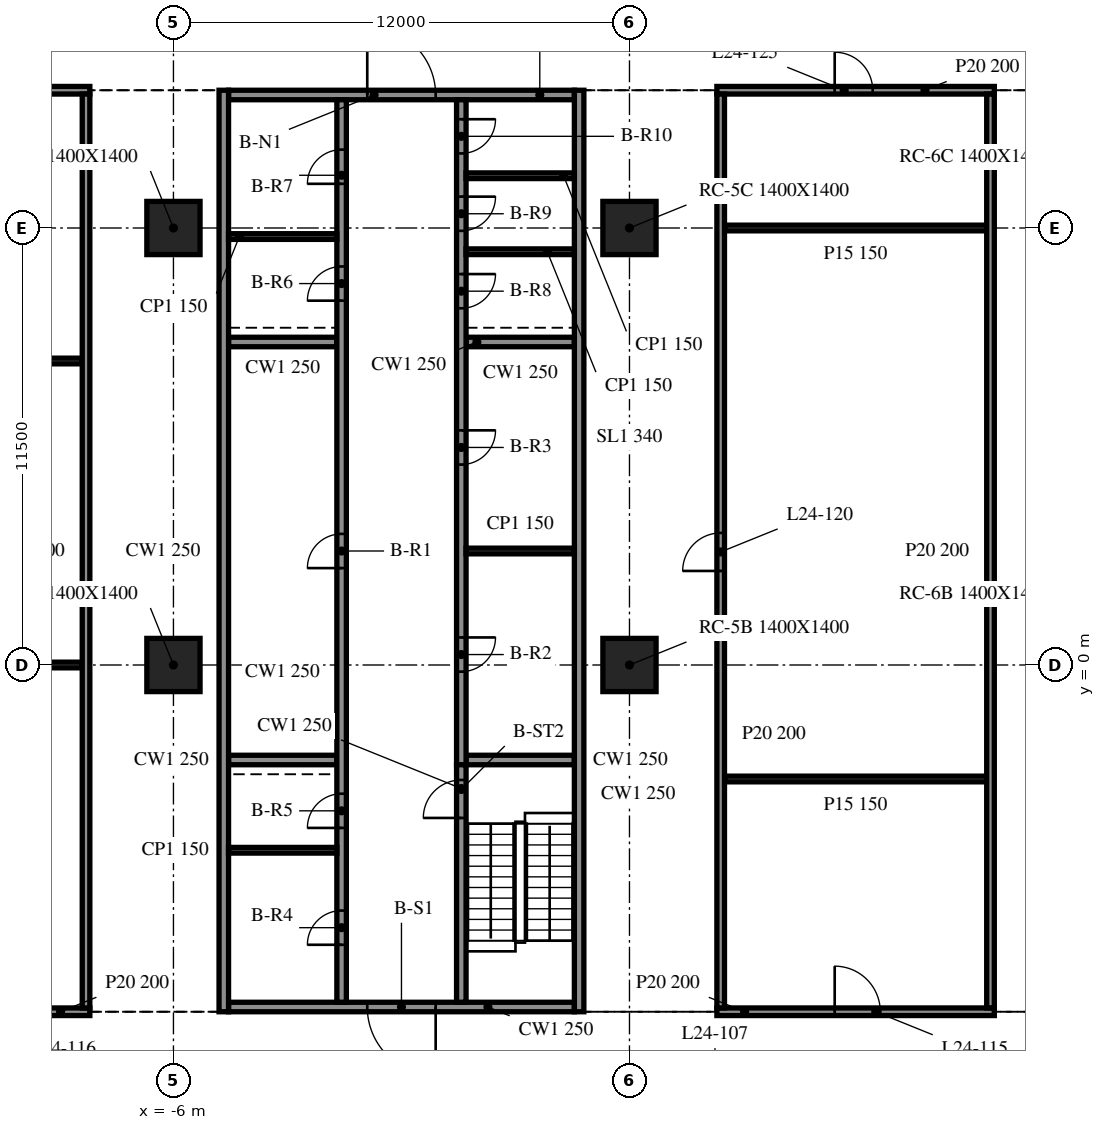
"""IFC4 building model, lengths in metres.
Left out: names, types, materials, properties, quantities, classifications, styles, units other than length and angle.
Written with IfcOpenShell. Run it as: python <this file> out.ifc"""

import sys

from ifc_helpers import new_model, si_unit, direction, frame, frame_2d, origin, origin_2d, place, context, subcontext, project, spatial, rectangle, extrude, element, fill, save


model = new_model("IFC4")
c1 = context("Model", 3, precision=1e-05, world=origin(), true_north=direction((0.0, 1.0)))
c2 = subcontext(c1, "Body", "Model", "MODEL_VIEW")
j1 = project(units=[si_unit("LENGTHUNIT", "METRE"), si_unit("PLANEANGLEUNIT", "RADIAN")], contexts=[c1])
p1 = place(None, origin())
s1 = spatial("IfcSite", under=j1, at=p1, CompositionType="ELEMENT")
p2 = place(p1, origin())
s2 = spatial("IfcBuilding", under=s1, at=p2, CompositionType="ELEMENT")
p3 = place(p2, frame((0.0, 0.0, 105.3)))
s3 = spatial("IfcBuildingStorey", under=s2, at=p3, CompositionType="ELEMENT", Elevation=105.3)
for number, where, z_axis, x_axis in (
    (1, (-6.0, 0.0, -0.34), (0.0, 0.0, 1.0), (1.0, 0.0, 0.0)),
    (2, (-6.0, 11.5, -0.34), (0.0, 0.0, 1.0), (1.0, 0.0, 0.0)),
    (3, (6.0, 0.0, -0.34), (0.0, 0.0, 1.0), (1.0, 0.0, 0.0)),
    (4, (6.0, 11.5, -0.34), (0.0, 0.0, 1.0), (1.0, 0.0, 0.0)),
):
    element("IfcColumn", number, at=place(p3, frame(where, z_axis=z_axis, x_axis=x_axis)), inside=s3, PredefinedType="COLUMN", context=c2, shape_type="SweptSolid", body=[
        extrude(rectangle(XDim=1.4, YDim=1.4, at=origin_2d()), origin(), (0.0, 0.0, 1.0), 4.1),
    ])
for number, where, z_axis, x_axis in (
    (5, (-4.675, 15.125, 0.0), (0.0, 0.0, 1.0), (0.0, -1.0, 0.0)),
    (6, (4.675, -9.125, 0.0), (0.0, 0.0, 1.0), (0.0, 1.0, 0.0)),
):
    element("IfcWall", number, at=place(p3, frame(where, z_axis=z_axis, x_axis=x_axis)), inside=s3, PredefinedType="SOLIDWALL", context=c2, shape_type="SweptSolid", body=[
        extrude(rectangle(XDim=24.25, YDim=0.25, at=frame_2d((12.125, 0.0))), origin(), (0.0, 0.0, 1.0), 3.76),
    ])
p4 = place(p3, frame((4.55, -9.0, 0.0), z_axis=(0.0, 0.0, 1.0), x_axis=(-1.0, 0.0, 0.0)))
e7 = element("IfcWall", 7, at=p4, inside=s3, PredefinedType="SOLIDWALL", context=c2, shape_type="SweptSolid", body=[
    extrude(rectangle(XDim=9.1, YDim=0.25, at=frame_2d((4.55, 0.0))), origin(), (0.0, 0.0, 1.0), 3.76),
])
p5 = place(p4, frame((3.65, 0.0, 0.0)))
e8 = element("IfcOpeningElement", 8, at=p5, cuts=e7, PredefinedType="OPENING", context=c2, shape_type="SweptSolid", body=[
    extrude(rectangle(XDim=1.8, YDim=2.1, at=frame_2d((0.9, 1.05))), frame((0.0, 0.135, 0.0), z_axis=(0.0, -1.0, 0.0), x_axis=(1.0, 0.0, 0.0)), (0.0, 0.0, 1.0), 0.27),
])
p6 = place(p3, frame((-4.55, 15.0, 0.0), z_axis=(0.0, 0.0, 1.0), x_axis=(1.0, 0.0, 0.0)))
e9 = element("IfcWall", 9, at=p6, inside=s3, PredefinedType="SOLIDWALL", context=c2, shape_type="SweptSolid", body=[
    extrude(rectangle(XDim=9.1, YDim=0.25, at=frame_2d((4.55, 0.0))), origin(), (0.0, 0.0, 1.0), 3.76),
])
p7 = place(p6, frame((3.65, 0.0, 0.0)))
e10 = element("IfcOpeningElement", 10, at=p7, cuts=e9, PredefinedType="OPENING", context=c2, shape_type="SweptSolid", body=[
    extrude(rectangle(XDim=1.8, YDim=2.1, at=frame_2d((0.9, 1.05))), frame((0.0, 0.135, 0.0), z_axis=(0.0, -1.0, 0.0), x_axis=(1.0, 0.0, 0.0)), (0.0, 0.0, 1.0), 0.27),
])
p8 = place(p3, frame((-1.575, -8.875, 0.0), z_axis=(0.0, 0.0, 1.0), x_axis=(0.0, 1.0, 0.0)))
e11 = element("IfcWall", 11, at=p8, inside=s3, PredefinedType="SOLIDWALL", context=c2, shape_type="SweptSolid", body=[
    extrude(rectangle(XDim=23.75, YDim=0.25, at=frame_2d((11.875, 0.0))), origin(), (0.0, 0.0, 1.0), 3.76),
])
p9 = place(p8, frame((11.425, 0.0, 0.0)))
e12 = element("IfcOpeningElement", 12, at=p9, cuts=e11, PredefinedType="OPENING", context=c2, shape_type="SweptSolid", body=[
    extrude(rectangle(XDim=0.9, YDim=2.1, at=frame_2d((0.45, 1.05))), frame((0.0, 0.135, 0.0), z_axis=(0.0, -1.0, 0.0), x_axis=(1.0, 0.0, 0.0)), (0.0, 0.0, 1.0), 0.27),
])
p10 = place(p8, frame((1.512, 0.0, 0.0)))
e13 = element("IfcOpeningElement", 13, at=p10, cuts=e11, PredefinedType="OPENING", context=c2, shape_type="SweptSolid", body=[
    extrude(rectangle(XDim=0.9, YDim=2.1, at=frame_2d((0.45, 1.05))), frame((0.0, 0.135, 0.0), z_axis=(0.0, -1.0, 0.0), x_axis=(1.0, 0.0, 0.0)), (0.0, 0.0, 1.0), 0.27),
])
p11 = place(p8, frame((4.587, 0.0, 0.0)))
e14 = element("IfcOpeningElement", 14, at=p11, cuts=e11, PredefinedType="OPENING", context=c2, shape_type="SweptSolid", body=[
    extrude(rectangle(XDim=0.9, YDim=2.1, at=frame_2d((0.45, 1.05))), frame((0.0, 0.135, 0.0), z_axis=(0.0, -1.0, 0.0), x_axis=(1.0, 0.0, 0.0)), (0.0, 0.0, 1.0), 0.27),
])
p12 = place(p8, frame((18.462, 0.0, 0.0)))
e15 = element("IfcOpeningElement", 15, at=p12, cuts=e11, PredefinedType="OPENING", context=c2, shape_type="SweptSolid", body=[
    extrude(rectangle(XDim=0.9, YDim=2.1, at=frame_2d((0.45, 1.05))), frame((0.0, 0.135, 0.0), z_axis=(0.0, -1.0, 0.0), x_axis=(1.0, 0.0, 0.0)), (0.0, 0.0, 1.0), 0.27),
])
p13 = place(p8, frame((21.538, 0.0, 0.0)))
e16 = element("IfcOpeningElement", 16, at=p13, cuts=e11, PredefinedType="OPENING", context=c2, shape_type="SweptSolid", body=[
    extrude(rectangle(XDim=0.9, YDim=2.1, at=frame_2d((0.45, 1.05))), frame((0.0, 0.135, 0.0), z_axis=(0.0, -1.0, 0.0), x_axis=(1.0, 0.0, 0.0)), (0.0, 0.0, 1.0), 0.27),
])
p14 = place(p3, frame((1.575, -8.875, 0.0), z_axis=(0.0, 0.0, 1.0), x_axis=(0.0, 1.0, 0.0)))
e17 = element("IfcWall", 17, at=p14, inside=s3, PredefinedType="SOLIDWALL", context=c2, shape_type="SweptSolid", body=[
    extrude(rectangle(XDim=6.25, YDim=0.25, at=frame_2d((3.125, 0.0))), origin(), (0.0, 0.0, 1.0), 3.76),
])
p15 = place(p14, frame((4.85, 0.0, 0.0)))
e18 = element("IfcOpeningElement", 18, at=p15, cuts=e17, PredefinedType="OPENING", context=c2, shape_type="SweptSolid", body=[
    extrude(rectangle(XDim=1.0, YDim=2.1, at=frame_2d((0.5, 1.05))), frame((0.0, 0.135, 0.0), z_axis=(0.0, -1.0, 0.0), x_axis=(1.0, 0.0, 0.0)), (0.0, 0.0, 1.0), 0.27),
])
p16 = place(p3, frame((1.575, 14.875, 0.0), z_axis=(0.0, 0.0, 1.0), x_axis=(0.0, -1.0, 0.0)))
e19 = element("IfcWall", 19, at=p16, inside=s3, PredefinedType="SOLIDWALL", context=c2, shape_type="SweptSolid", body=[
    extrude(rectangle(XDim=17.5, YDim=0.25, at=frame_2d((8.75, 0.0))), origin(), (0.0, 0.0, 1.0), 3.76),
])
p17 = place(p16, frame((14.15, 0.0, 0.0)))
e20 = element("IfcOpeningElement", 20, at=p17, cuts=e19, PredefinedType="OPENING", context=c2, shape_type="SweptSolid", body=[
    extrude(rectangle(XDim=0.9, YDim=2.1, at=frame_2d((0.45, 1.05))), frame((0.0, 0.135, 0.0), z_axis=(0.0, -1.0, 0.0), x_axis=(1.0, 0.0, 0.0)), (0.0, 0.0, 1.0), 0.27),
])
p18 = place(p16, frame((8.7, 0.0, 0.0)))
e21 = element("IfcOpeningElement", 21, at=p18, cuts=e19, PredefinedType="OPENING", context=c2, shape_type="SweptSolid", body=[
    extrude(rectangle(XDim=0.9, YDim=2.1, at=frame_2d((0.45, 1.05))), frame((0.0, 0.135, 0.0), z_axis=(0.0, -1.0, 0.0), x_axis=(1.0, 0.0, 0.0)), (0.0, 0.0, 1.0), 0.27),
])
p19 = place(p16, frame((4.587, 0.0, 0.0)))
e22 = element("IfcOpeningElement", 22, at=p19, cuts=e19, PredefinedType="OPENING", context=c2, shape_type="SweptSolid", body=[
    extrude(rectangle(XDim=0.9, YDim=2.1, at=frame_2d((0.45, 1.05))), frame((0.0, 0.135, 0.0), z_axis=(0.0, -1.0, 0.0), x_axis=(1.0, 0.0, 0.0)), (0.0, 0.0, 1.0), 0.27),
])
p20 = place(p16, frame((2.55, 0.0, 0.0)))
e23 = element("IfcOpeningElement", 23, at=p20, cuts=e19, PredefinedType="OPENING", context=c2, shape_type="SweptSolid", body=[
    extrude(rectangle(XDim=0.9, YDim=2.1, at=frame_2d((0.45, 1.05))), frame((0.0, 0.135, 0.0), z_axis=(0.0, -1.0, 0.0), x_axis=(1.0, 0.0, 0.0)), (0.0, 0.0, 1.0), 0.27),
])
p21 = place(p16, frame((0.512, 0.0, 0.0)))
e24 = element("IfcOpeningElement", 24, at=p21, cuts=e19, PredefinedType="OPENING", context=c2, shape_type="SweptSolid", body=[
    extrude(rectangle(XDim=0.9, YDim=2.1, at=frame_2d((0.45, 1.05))), frame((0.0, 0.135, 0.0), z_axis=(0.0, -1.0, 0.0), x_axis=(1.0, 0.0, 0.0)), (0.0, 0.0, 1.0), 0.27),
])
for number, where, z_axis, x_axis in (
    (25, (-4.55, -2.5, 0.0), (0.0, 0.0, 1.0), (1.0, 0.0, 0.0)),
    (26, (-4.55, 8.5, 0.0), (0.0, 0.0, 1.0), (1.0, 0.0, 0.0)),
    (27, (1.7, -2.5, 0.0), (0.0, 0.0, 1.0), (1.0, 0.0, 0.0)),
    (28, (1.7, 8.5, 0.0), (0.0, 0.0, 1.0), (1.0, 0.0, 0.0)),
):
    element("IfcWall", number, at=place(p3, frame(where, z_axis=z_axis, x_axis=x_axis)), inside=s3, PredefinedType="SOLIDWALL", context=c2, shape_type="SweptSolid", body=[
        extrude(rectangle(XDim=2.85, YDim=0.25, at=frame_2d((1.425, 0.0))), origin(), (0.0, 0.0, 1.0), 3.76),
    ])
for number, where, z_axis, x_axis in (
    (29, (1.7, 3.0, 0.0), (0.0, 0.0, 1.0), (1.0, 0.0, 0.0)),
    (30, (-4.55, -4.875, 0.0), (0.0, 0.0, 1.0), (1.0, 0.0, 0.0)),
    (31, (-4.55, 11.275, 0.0), (0.0, 0.0, 1.0), (1.0, 0.0, 0.0)),
    (32, (1.7, 10.875, 0.0), (0.0, 0.0, 1.0), (1.0, 0.0, 0.0)),
    (33, (1.7, 12.875, 0.0), (0.0, 0.0, 1.0), (1.0, 0.0, 0.0)),
):
    element("IfcWall", number, at=place(p3, frame(where, z_axis=z_axis, x_axis=x_axis)), inside=s3, PredefinedType="PARTITIONING", context=c2, shape_type="SweptSolid", body=[
        extrude(rectangle(XDim=2.85, YDim=0.15, at=frame_2d((1.425, 0.0))), origin(), (0.0, 0.0, 1.0), 3.76),
    ])
p22 = place(p3, frame((-15.9, -9.125, 0.0), z_axis=(0.0, 0.0, 1.0), x_axis=(1.0, 0.0, 0.0)))
e34 = element("IfcWall", 34, at=p22, inside=s3, PredefinedType="PARTITIONING", context=c2, shape_type="SweptSolid", body=[
    extrude(rectangle(XDim=7.7, YDim=0.2, at=frame_2d((3.85, 0.0))), origin(), (0.0, 0.0, 1.0), 3.76),
])
p23 = place(p22, frame((3.3, 0.0, 0.0)))
e35 = element("IfcOpeningElement", 35, at=p23, cuts=e34, PredefinedType="OPENING", context=c2, shape_type="SweptSolid", body=[
    extrude(rectangle(XDim=1.2, YDim=2.1, at=frame_2d((0.6, 1.05))), frame((0.0, 0.11, 0.0), z_axis=(0.0, -1.0, 0.0), x_axis=(1.0, 0.0, 0.0)), (0.0, 0.0, 1.0), 0.22),
])
p24 = place(p3, frame((8.3, -9.125, 0.0), z_axis=(0.0, 0.0, 1.0), x_axis=(1.0, 0.0, 0.0)))
e36 = element("IfcWall", 36, at=p24, inside=s3, PredefinedType="PARTITIONING", context=c2, shape_type="SweptSolid", body=[
    extrude(rectangle(XDim=7.3, YDim=0.2, at=frame_2d((3.65, 0.0))), origin(), (0.0, 0.0, 1.0), 3.76),
])
p25 = place(p24, frame((3.1, 0.0, 0.0)))
e37 = element("IfcOpeningElement", 37, at=p25, cuts=e36, PredefinedType="OPENING", context=c2, shape_type="SweptSolid", body=[
    extrude(rectangle(XDim=1.2, YDim=2.1, at=frame_2d((0.6, 1.05))), frame((0.0, 0.11, 0.0), z_axis=(0.0, -1.0, 0.0), x_axis=(1.0, 0.0, 0.0)), (0.0, 0.0, 1.0), 0.22),
])
p26 = place(p3, frame((8.5, -3.0, 0.0), z_axis=(0.0, 0.0, 1.0), x_axis=(1.0, 0.0, 0.0)))
e38 = element("IfcWall", 38, at=p26, inside=s3, PredefinedType="PARTITIONING", context=c2, shape_type="SweptSolid", body=[
    extrude(rectangle(XDim=6.9, YDim=0.15, at=frame_2d((3.45, 0.0))), origin(), (0.0, 0.0, 1.0), 3.76),
])
for number, where, z_axis, x_axis in (
    (39, (-15.7, 0.0, 0.0), (0.0, 0.0, 1.0), (1.0, 0.0, 0.0)),
    (40, (-15.7, 8.0, 0.0), (0.0, 0.0, 1.0), (1.0, 0.0, 0.0)),
):
    element("IfcWall", number, at=place(p3, frame(where, z_axis=z_axis, x_axis=x_axis)), inside=s3, PredefinedType="PARTITIONING", context=c2, shape_type="SweptSolid", body=[
        extrude(rectangle(XDim=7.3, YDim=0.15, at=frame_2d((3.65, 0.0))), origin(), (0.0, 0.0, 1.0), 3.76),
    ])
p27 = place(p3, frame((8.5, 11.5, 0.0), z_axis=(0.0, 0.0, 1.0), x_axis=(1.0, 0.0, 0.0)))
e41 = element("IfcWall", 41, at=p27, inside=s3, PredefinedType="PARTITIONING", context=c2, shape_type="SweptSolid", body=[
    extrude(rectangle(XDim=6.9, YDim=0.15, at=frame_2d((3.45, 0.0))), origin(), (0.0, 0.0, 1.0), 3.76),
])
p28 = place(p3, frame((-15.9, 15.125, 0.0), z_axis=(0.0, 0.0, 1.0), x_axis=(1.0, 0.0, 0.0)))
e42 = element("IfcWall", 42, at=p28, inside=s3, PredefinedType="PARTITIONING", context=c2, shape_type="SweptSolid", body=[
    extrude(rectangle(XDim=7.7, YDim=0.2, at=frame_2d((3.85, 0.0))), origin(), (0.0, 0.0, 1.0), 3.76),
])
p29 = place(p28, frame((3.3, 0.0, 0.0)))
e43 = element("IfcOpeningElement", 43, at=p29, cuts=e42, PredefinedType="OPENING", context=c2, shape_type="SweptSolid", body=[
    extrude(rectangle(XDim=1.0, YDim=2.1, at=frame_2d((0.5, 1.05))), frame((0.0, 0.11, 0.0), z_axis=(0.0, -1.0, 0.0), x_axis=(1.0, 0.0, 0.0)), (0.0, 0.0, 1.0), 0.22),
])
p30 = place(p3, frame((8.3, 15.125, 0.0), z_axis=(0.0, 0.0, 1.0), x_axis=(1.0, 0.0, 0.0)))
e44 = element("IfcWall", 44, at=p30, inside=s3, PredefinedType="PARTITIONING", context=c2, shape_type="SweptSolid", body=[
    extrude(rectangle(XDim=7.3, YDim=0.2, at=frame_2d((3.65, 0.0))), origin(), (0.0, 0.0, 1.0), 3.76),
])
p31 = place(p30, frame((3.1, 0.0, 0.0)))
e45 = element("IfcOpeningElement", 45, at=p31, cuts=e44, PredefinedType="OPENING", context=c2, shape_type="SweptSolid", body=[
    extrude(rectangle(XDim=1.0, YDim=2.1, at=frame_2d((0.5, 1.05))), frame((0.0, 0.11, 0.0), z_axis=(0.0, -1.0, 0.0), x_axis=(1.0, 0.0, 0.0)), (0.0, 0.0, 1.0), 0.22),
])
p32 = place(p3, frame((-8.3, -9.025, 0.0), z_axis=(0.0, 0.0, 1.0), x_axis=(0.0, 1.0, 0.0)))
e46 = element("IfcWall", 46, at=p32, inside=s3, PredefinedType="PARTITIONING", context=c2, shape_type="SweptSolid", body=[
    extrude(rectangle(XDim=24.05, YDim=0.2, at=frame_2d((12.025, 0.0))), origin(), (0.0, 0.0, 1.0), 3.76),
])
p33 = place(p3, frame((8.4, -9.025, 0.0), z_axis=(0.0, 0.0, 1.0), x_axis=(0.0, 1.0, 0.0)))
e47 = element("IfcWall", 47, at=p33, inside=s3, PredefinedType="PARTITIONING", context=c2, shape_type="SweptSolid", body=[
    extrude(rectangle(XDim=24.05, YDim=0.2, at=frame_2d((12.025, 0.0))), origin(), (0.0, 0.0, 1.0), 3.76),
])
p34 = place(p33, frame((11.5, 0.0, 0.0)))
e48 = element("IfcOpeningElement", 48, at=p34, cuts=e47, PredefinedType="OPENING", context=c2, shape_type="SweptSolid", body=[
    extrude(rectangle(XDim=1.0, YDim=2.1, at=frame_2d((0.5, 1.05))), frame((0.0, 0.11, 0.0), z_axis=(0.0, -1.0, 0.0), x_axis=(1.0, 0.0, 0.0)), (0.0, 0.0, 1.0), 0.22),
])
p35 = place(p3, frame((15.5, -9.025, 0.0), z_axis=(0.0, 0.0, 1.0), x_axis=(0.0, 1.0, 0.0)))
e49 = element("IfcWall", 49, at=p35, inside=s3, PredefinedType="PARTITIONING", context=c2, shape_type="SweptSolid", body=[
    extrude(rectangle(XDim=24.05, YDim=0.2, at=frame_2d((12.025, 0.0))), origin(), (0.0, 0.0, 1.0), 3.76),
])
p36 = place(p5, origin())
e50 = element("IfcDoor", 50, at=p36, inside=s3, OperationType="DOUBLE_DOOR_SINGLE_SWING", PredefinedType="DOOR", context=c2, shape_type="SweptSolid", body=[
    extrude(rectangle(XDim=1.8, YDim=2.1, at=frame_2d((0.9, 1.05))), frame((0.0, 0.025, 0.0), z_axis=(0.0, -1.0, 0.0), x_axis=(1.0, 0.0, 0.0)), (0.0, 0.0, 1.0), 0.05),
])
fill(e8, e50)
p37 = place(p7, origin())
e51 = element("IfcDoor", 51, at=p37, inside=s3, OperationType="DOUBLE_DOOR_SINGLE_SWING", PredefinedType="DOOR", context=c2, shape_type="SweptSolid", body=[
    extrude(rectangle(XDim=1.8, YDim=2.1, at=frame_2d((0.9, 1.05))), frame((0.0, 0.025, 0.0), z_axis=(0.0, -1.0, 0.0), x_axis=(1.0, 0.0, 0.0)), (0.0, 0.0, 1.0), 0.05),
])
fill(e10, e51)
p38 = place(p9, origin())
e52 = element("IfcDoor", 52, at=p38, inside=s3, OperationType="SINGLE_SWING_LEFT", PredefinedType="DOOR", context=c2, shape_type="SweptSolid", body=[
    extrude(rectangle(XDim=0.9, YDim=2.1, at=frame_2d((0.45, 1.05))), frame((0.0, 0.025, 0.0), z_axis=(0.0, -1.0, 0.0), x_axis=(1.0, 0.0, 0.0)), (0.0, 0.0, 1.0), 0.05),
])
fill(e12, e52)
p39 = place(p17, origin())
e53 = element("IfcDoor", 53, at=p39, inside=s3, OperationType="SINGLE_SWING_RIGHT", PredefinedType="DOOR", context=c2, shape_type="SweptSolid", body=[
    extrude(rectangle(XDim=0.9, YDim=2.1, at=frame_2d((0.45, 1.05))), frame((0.0, 0.025, 0.0), z_axis=(0.0, -1.0, 0.0), x_axis=(1.0, 0.0, 0.0)), (0.0, 0.0, 1.0), 0.05),
])
fill(e20, e53)
p40 = place(p18, origin())
e54 = element("IfcDoor", 54, at=p40, inside=s3, OperationType="SINGLE_SWING_LEFT", PredefinedType="DOOR", context=c2, shape_type="SweptSolid", body=[
    extrude(rectangle(XDim=0.9, YDim=2.1, at=frame_2d((0.45, 1.05))), frame((0.0, 0.025, 0.0), z_axis=(0.0, -1.0, 0.0), x_axis=(1.0, 0.0, 0.0)), (0.0, 0.0, 1.0), 0.05),
])
fill(e21, e54)
p41 = place(p10, origin())
e55 = element("IfcDoor", 55, at=p41, inside=s3, OperationType="SINGLE_SWING_RIGHT", PredefinedType="DOOR", context=c2, shape_type="SweptSolid", body=[
    extrude(rectangle(XDim=0.9, YDim=2.1, at=frame_2d((0.45, 1.05))), frame((0.0, 0.025, 0.0), z_axis=(0.0, -1.0, 0.0), x_axis=(1.0, 0.0, 0.0)), (0.0, 0.0, 1.0), 0.05),
])
fill(e13, e55)
p42 = place(p11, origin())
e56 = element("IfcDoor", 56, at=p42, inside=s3, OperationType="SINGLE_SWING_LEFT", PredefinedType="DOOR", context=c2, shape_type="SweptSolid", body=[
    extrude(rectangle(XDim=0.9, YDim=2.1, at=frame_2d((0.45, 1.05))), frame((0.0, 0.025, 0.0), z_axis=(0.0, -1.0, 0.0), x_axis=(1.0, 0.0, 0.0)), (0.0, 0.0, 1.0), 0.05),
])
fill(e14, e56)
p43 = place(p12, origin())
e57 = element("IfcDoor", 57, at=p43, inside=s3, OperationType="SINGLE_SWING_RIGHT", PredefinedType="DOOR", context=c2, shape_type="SweptSolid", body=[
    extrude(rectangle(XDim=0.9, YDim=2.1, at=frame_2d((0.45, 1.05))), frame((0.0, 0.025, 0.0), z_axis=(0.0, -1.0, 0.0), x_axis=(1.0, 0.0, 0.0)), (0.0, 0.0, 1.0), 0.05),
])
fill(e15, e57)
p44 = place(p13, origin())
e58 = element("IfcDoor", 58, at=p44, inside=s3, OperationType="SINGLE_SWING_LEFT", PredefinedType="DOOR", context=c2, shape_type="SweptSolid", body=[
    extrude(rectangle(XDim=0.9, YDim=2.1, at=frame_2d((0.45, 1.05))), frame((0.0, 0.025, 0.0), z_axis=(0.0, -1.0, 0.0), x_axis=(1.0, 0.0, 0.0)), (0.0, 0.0, 1.0), 0.05),
])
fill(e16, e58)
p45 = place(p19, origin())
e59 = element("IfcDoor", 59, at=p45, inside=s3, OperationType="SINGLE_SWING_RIGHT", PredefinedType="DOOR", context=c2, shape_type="SweptSolid", body=[
    extrude(rectangle(XDim=0.9, YDim=2.1, at=frame_2d((0.45, 1.05))), frame((0.0, 0.025, 0.0), z_axis=(0.0, -1.0, 0.0), x_axis=(1.0, 0.0, 0.0)), (0.0, 0.0, 1.0), 0.05),
])
fill(e22, e59)
p46 = place(p20, origin())
e60 = element("IfcDoor", 60, at=p46, inside=s3, OperationType="SINGLE_SWING_LEFT", PredefinedType="DOOR", context=c2, shape_type="SweptSolid", body=[
    extrude(rectangle(XDim=0.9, YDim=2.1, at=frame_2d((0.45, 1.05))), frame((0.0, 0.025, 0.0), z_axis=(0.0, -1.0, 0.0), x_axis=(1.0, 0.0, 0.0)), (0.0, 0.0, 1.0), 0.05),
])
fill(e23, e60)
p47 = place(p21, origin())
e61 = element("IfcDoor", 61, at=p47, inside=s3, OperationType="SINGLE_SWING_RIGHT", PredefinedType="DOOR", context=c2, shape_type="SweptSolid", body=[
    extrude(rectangle(XDim=0.9, YDim=2.1, at=frame_2d((0.45, 1.05))), frame((0.0, 0.025, 0.0), z_axis=(0.0, -1.0, 0.0), x_axis=(1.0, 0.0, 0.0)), (0.0, 0.0, 1.0), 0.05),
])
fill(e24, e61)
p48 = place(p15, origin())
e62 = element("IfcDoor", 62, at=p48, inside=s3, OperationType="SINGLE_SWING_LEFT", PredefinedType="DOOR", context=c2, shape_type="SweptSolid", body=[
    extrude(rectangle(XDim=1.0, YDim=2.1, at=frame_2d((0.5, 1.05))), frame((0.0, 0.025, 0.0), z_axis=(0.0, -1.0, 0.0), x_axis=(1.0, 0.0, 0.0)), (0.0, 0.0, 1.0), 0.05),
])
fill(e18, e62)
p49 = place(p25, origin())
e63 = element("IfcDoor", 63, at=p49, inside=s3, OperationType="SINGLE_SWING_RIGHT", PredefinedType="DOOR", context=c2, shape_type="SweptSolid", body=[
    extrude(rectangle(XDim=1.2, YDim=2.1, at=frame_2d((0.6, 1.05))), frame((0.0, 0.025, 0.0), z_axis=(0.0, -1.0, 0.0), x_axis=(1.0, 0.0, 0.0)), (0.0, 0.0, 1.0), 0.05),
])
fill(e37, e63)
p50 = place(p34, origin())
e64 = element("IfcDoor", 64, at=p50, inside=s3, OperationType="SINGLE_SWING_RIGHT", PredefinedType="DOOR", context=c2, shape_type="SweptSolid", body=[
    extrude(rectangle(XDim=1.0, YDim=2.1, at=frame_2d((0.5, 1.05))), frame((0.0, 0.025, 0.0), z_axis=(0.0, -1.0, 0.0), x_axis=(1.0, 0.0, 0.0)), (0.0, 0.0, 1.0), 0.05),
])
fill(e48, e64)
p51 = place(p31, origin())
e65 = element("IfcDoor", 65, at=p51, inside=s3, OperationType="SINGLE_SWING_RIGHT", PredefinedType="DOOR", context=c2, shape_type="SweptSolid", body=[
    extrude(rectangle(XDim=1.0, YDim=2.1, at=frame_2d((0.5, 1.05))), frame((0.0, 0.025, 0.0), z_axis=(0.0, -1.0, 0.0), x_axis=(1.0, 0.0, 0.0)), (0.0, 0.0, 1.0), 0.05),
])
fill(e45, e65)
save(model, sys.argv[1])
